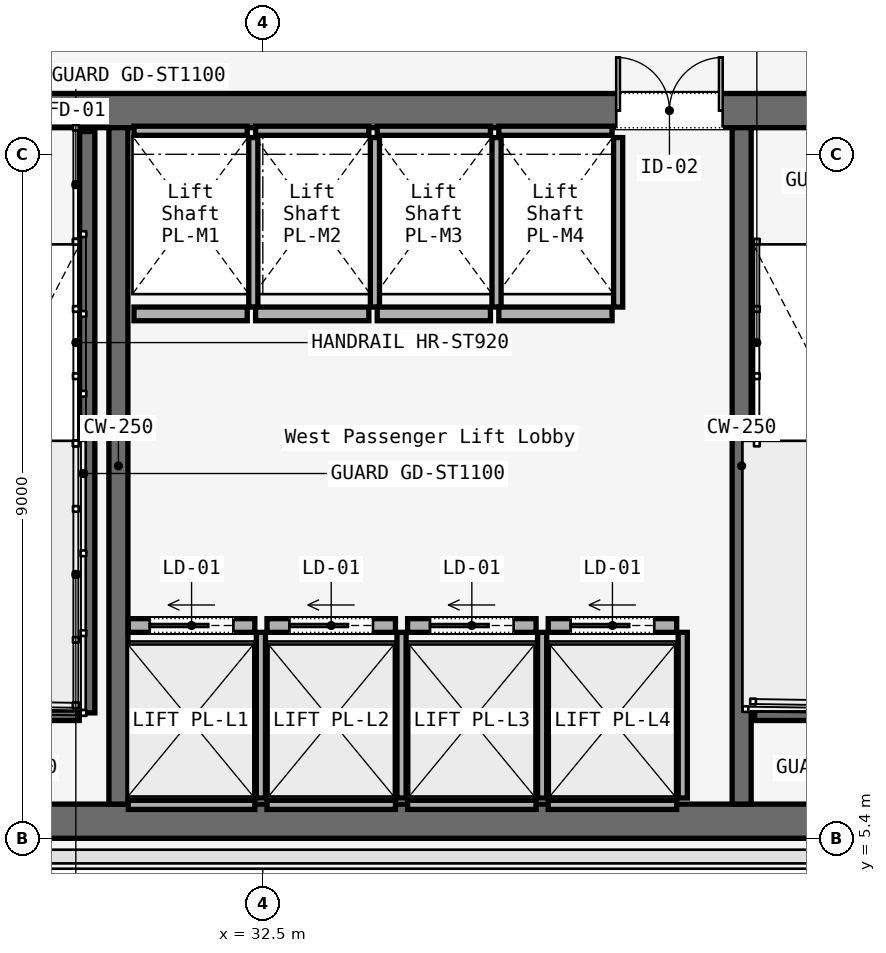
"""IFC4 building model, lengths in metres.
Left out: names, types, materials, properties, quantities, classifications, styles, units other than length and angle.
Written with IfcOpenShell. Run it as: python <this file> out.ifc"""

import sys

from ifc_helpers import new_model, si_unit, direction, frame, frame_2d, origin, place, context, subcontext, project, spatial, rectangle, extrude, element, fill, save


model = new_model("IFC4")
c1 = context("Model", 3, precision=1e-05, world=origin(), true_north=direction((0.0, 1.0)))
c2 = subcontext(c1, "Body", "Model", "MODEL_VIEW")
j1 = project(units=[si_unit("LENGTHUNIT", "METRE"), si_unit("PLANEANGLEUNIT", "RADIAN")], contexts=[c1])
p1 = place(None, origin())
s1 = spatial("IfcSite", under=j1, at=p1, CompositionType="ELEMENT")
p2 = place(p1, origin())
s2 = spatial("IfcBuilding", under=s1, at=p2, CompositionType="ELEMENT")
p3 = place(p2, frame((0.0, 0.0, 89.2)))
s3 = spatial("IfcBuildingStorey", under=s2, at=p3, CompositionType="ELEMENT", Elevation=89.2)
p4 = place(p3, frame((26.45, 14.975, 0.0), z_axis=(0.0, 0.0, 1.0), x_axis=(1.0, 0.0, 0.0)))
e1 = element("IfcWall", 1, at=p4, inside=s3, PredefinedType="SOLIDWALL", context=c2, shape_type="SweptSolid", body=[
    extrude(rectangle(XDim=31.1, YDim=0.45, at=frame_2d((15.55, 0.0))), origin(), (0.0, 0.0, 1.0), 3.58),
])
p5 = place(p4, frame((1.65, 0.0, 0.0)))
e2 = element("IfcOpeningElement", 2, at=p5, cuts=e1, PredefinedType="OPENING", context=c2, shape_type="SweptSolid", body=[
    extrude(rectangle(XDim=1.1, YDim=2.2, at=frame_2d((0.55, 1.1))), frame((0.0, 0.225, 0.0), z_axis=(0.0, -1.0, 0.0), x_axis=(1.0, 0.0, 0.0)), (0.0, 0.0, 1.0), 0.45),
])
p6 = place(p4, frame((13.65, 0.0, 0.0)))
e3 = element("IfcOpeningElement", 3, at=p6, cuts=e1, PredefinedType="OPENING", context=c2, shape_type="SweptSolid", body=[
    extrude(rectangle(XDim=1.1, YDim=2.2, at=frame_2d((0.55, 1.1))), frame((0.0, 0.225, 0.0), z_axis=(0.0, -1.0, 0.0), x_axis=(1.0, 0.0, 0.0)), (0.0, 0.0, 1.0), 0.45),
])
p7 = place(p4, frame((25.55, 0.0, 0.0)))
e4 = element("IfcOpeningElement", 4, at=p7, cuts=e1, PredefinedType="OPENING", context=c2, shape_type="SweptSolid", body=[
    extrude(rectangle(XDim=1.1, YDim=2.2, at=frame_2d((0.55, 1.1))), frame((0.0, 0.225, 0.0), z_axis=(0.0, -1.0, 0.0), x_axis=(1.0, 0.0, 0.0)), (0.0, 0.0, 1.0), 0.45),
])
p8 = place(p4, frame((10.7, 0.0, 0.0)))
e5 = element("IfcOpeningElement", 5, at=p8, cuts=e1, PredefinedType="OPENING", context=c2, shape_type="SweptSolid", body=[
    extrude(rectangle(XDim=1.4, YDim=2.2, at=frame_2d((0.7, 1.1))), frame((0.0, 0.225, 0.0), z_axis=(0.0, -1.0, 0.0), x_axis=(1.0, 0.0, 0.0)), (0.0, 0.0, 1.0), 0.45),
])
p9 = place(p4, frame((19.35, 0.0, 0.0)))
e6 = element("IfcOpeningElement", 6, at=p9, cuts=e1, PredefinedType="OPENING", context=c2, shape_type="SweptSolid", body=[
    extrude(rectangle(XDim=1.1, YDim=2.2, at=frame_2d((0.55, 1.1))), frame((0.0, 0.225, 0.0), z_axis=(0.0, -1.0, 0.0), x_axis=(1.0, 0.0, 0.0)), (0.0, 0.0, 1.0), 0.45),
])
p10 = place(p4, frame((21.4, 0.0, 0.0)))
e7 = element("IfcOpeningElement", 7, at=p10, cuts=e1, PredefinedType="OPENING", context=c2, shape_type="SweptSolid", body=[
    extrude(rectangle(XDim=0.9, YDim=2.1, at=frame_2d((0.45, 1.05))), frame((0.0, 0.225, 0.0), z_axis=(0.0, -1.0, 0.0), x_axis=(1.0, 0.0, 0.0)), (0.0, 0.0, 1.0), 0.45),
])
p11 = place(p4, frame((23.35, 0.0, 0.0)))
e8 = element("IfcOpeningElement", 8, at=p11, cuts=e1, PredefinedType="OPENING", context=c2, shape_type="SweptSolid", body=[
    extrude(rectangle(XDim=1.3, YDim=2.3, at=frame_2d((0.65, 1.15))), frame((0.0, 0.225, 0.0), z_axis=(0.0, -1.0, 0.0), x_axis=(1.0, 0.0, 0.0)), (0.0, 0.0, 1.0), 0.45),
])
p12 = place(p3, frame((26.45, 5.625, 0.0), z_axis=(0.0, 0.0, 1.0), x_axis=(1.0, 0.0, 0.0)))
e9 = element("IfcWall", 9, at=p12, inside=s3, PredefinedType="SOLIDWALL", context=c2, shape_type="SweptSolid", body=[
    extrude(rectangle(XDim=31.1, YDim=0.45, at=frame_2d((15.55, 0.0))), origin(), (0.0, 0.0, 1.0), 3.58),
])
for number, where, z_axis, x_axis in (
    (10, (30.6, 5.85, 0.0), (0.0, 0.0, 1.0), (0.0, 1.0, 0.0)),
    (11, (38.8, 5.85, 0.0), (0.0, 0.0, 1.0), (0.0, 1.0, 0.0)),
):
    element("IfcWall", number, at=place(p3, frame(where, z_axis=z_axis, x_axis=x_axis)), inside=s3, PredefinedType="SOLIDWALL", context=c2, shape_type="SweptSolid", body=[
        extrude(rectangle(XDim=8.9, YDim=0.25, at=frame_2d((4.45, 0.0))), origin(), (0.0, 0.0, 1.0), 3.58),
    ])
p13 = place(p3, frame((30.19, 14.7, 0.0), z_axis=(0.0, 0.0, 1.0), x_axis=(0.0, -1.0, 0.0)))
e12 = element("IfcWall", 12, at=p13, inside=s3, PredefinedType="SOLIDWALL", context=c2, shape_type="SweptSolid", body=[
    extrude(rectangle(XDim=7.65, YDim=0.2, at=frame_2d((3.825, 0.0))), origin(), (0.0, 0.0, 1.0), 3.8),
])
for number, where, z_axis, x_axis in (
    (13, (26.97, 7.05, 0.0), (0.0, 0.0, 1.0), (1.0, 0.0, 0.0)),
    (14, (38.97, 7.05, 0.0), (0.0, 0.0, 1.0), (1.0, 0.0, 0.0)),
):
    element("IfcWall", number, at=place(p3, frame(where, z_axis=z_axis, x_axis=x_axis)), inside=s3, PredefinedType="SOLIDWALL", context=c2, shape_type="SweptSolid", body=[
        extrude(rectangle(XDim=3.115, YDim=0.2, at=frame_2d((1.558, 0.0))), origin(), (0.0, 0.0, 1.0), 3.8),
    ])
p14 = place(p3, frame((30.73, 8.2, 0.0), z_axis=(0.0, 0.0, 1.0), x_axis=(1.0, 0.0, 0.0)))
e15 = element("IfcWall", 15, at=p14, inside=s3, PredefinedType="SOLIDWALL", context=c2, shape_type="SweptSolid", body=[
    extrude(rectangle(XDim=1.665, YDim=0.18, at=frame_2d((0.833, 0.0))), origin(), (0.0, 0.0, 1.0), 2.95),
])
p15 = place(p14, frame((0.282, 0.0, 0.0)))
e16 = element("IfcOpeningElement", 16, at=p15, cuts=e15, PredefinedType="OPENING", context=c2, shape_type="SweptSolid", body=[
    extrude(rectangle(XDim=1.1, YDim=2.2, at=frame_2d((0.55, 1.1))), frame((0.0, 0.09, 0.0), z_axis=(0.0, -1.0, 0.0), x_axis=(1.0, 0.0, 0.0)), (0.0, 0.0, 1.0), 0.18),
])
p16 = place(p3, frame((30.73, 5.84, 0.0), z_axis=(0.0, 0.0, 1.0), x_axis=(1.0, 0.0, 0.0)))
e17 = element("IfcWall", 17, at=p16, inside=s3, PredefinedType="SOLIDWALL", context=c2, shape_type="SweptSolid", body=[
    extrude(rectangle(XDim=1.665, YDim=0.12, at=frame_2d((0.833, 0.0))), origin(), (0.0, 0.0, 1.0), 2.95),
])
p17 = place(p3, frame((32.475, 5.93, 0.0), z_axis=(0.0, 0.0, 1.0), x_axis=(0.0, 1.0, 0.0)))
e18 = element("IfcWall", 18, at=p17, inside=s3, PredefinedType="SOLIDWALL", context=c2, shape_type="SweptSolid", body=[
    extrude(rectangle(XDim=2.18, YDim=0.12, at=frame_2d((1.09, 0.0))), origin(), (0.0, 0.0, 1.0), 2.95),
])
p18 = place(p3, frame((32.555, 8.2, 0.0), z_axis=(0.0, 0.0, 1.0), x_axis=(1.0, 0.0, 0.0)))
e19 = element("IfcWall", 19, at=p18, inside=s3, PredefinedType="SOLIDWALL", context=c2, shape_type="SweptSolid", body=[
    extrude(rectangle(XDim=1.69, YDim=0.18, at=frame_2d((0.845, 0.0))), origin(), (0.0, 0.0, 1.0), 2.95),
])
p19 = place(p18, frame((0.295, 0.0, 0.0)))
e20 = element("IfcOpeningElement", 20, at=p19, cuts=e19, PredefinedType="OPENING", context=c2, shape_type="SweptSolid", body=[
    extrude(rectangle(XDim=1.1, YDim=2.2, at=frame_2d((0.55, 1.1))), frame((0.0, 0.09, 0.0), z_axis=(0.0, -1.0, 0.0), x_axis=(1.0, 0.0, 0.0)), (0.0, 0.0, 1.0), 0.18),
])
p20 = place(p3, frame((32.555, 5.84, 0.0), z_axis=(0.0, 0.0, 1.0), x_axis=(1.0, 0.0, 0.0)))
e21 = element("IfcWall", 21, at=p20, inside=s3, PredefinedType="SOLIDWALL", context=c2, shape_type="SweptSolid", body=[
    extrude(rectangle(XDim=1.69, YDim=0.12, at=frame_2d((0.845, 0.0))), origin(), (0.0, 0.0, 1.0), 2.95),
])
p21 = place(p3, frame((34.325, 5.93, 0.0), z_axis=(0.0, 0.0, 1.0), x_axis=(0.0, 1.0, 0.0)))
e22 = element("IfcWall", 22, at=p21, inside=s3, PredefinedType="SOLIDWALL", context=c2, shape_type="SweptSolid", body=[
    extrude(rectangle(XDim=2.18, YDim=0.12, at=frame_2d((1.09, 0.0))), origin(), (0.0, 0.0, 1.0), 2.95),
])
p22 = place(p3, frame((34.405, 8.2, 0.0), z_axis=(0.0, 0.0, 1.0), x_axis=(1.0, 0.0, 0.0)))
e23 = element("IfcWall", 23, at=p22, inside=s3, PredefinedType="SOLIDWALL", context=c2, shape_type="SweptSolid", body=[
    extrude(rectangle(XDim=1.69, YDim=0.18, at=frame_2d((0.845, 0.0))), origin(), (0.0, 0.0, 1.0), 2.95),
])
p23 = place(p22, frame((0.295, 0.0, 0.0)))
e24 = element("IfcOpeningElement", 24, at=p23, cuts=e23, PredefinedType="OPENING", context=c2, shape_type="SweptSolid", body=[
    extrude(rectangle(XDim=1.1, YDim=2.2, at=frame_2d((0.55, 1.1))), frame((0.0, 0.09, 0.0), z_axis=(0.0, -1.0, 0.0), x_axis=(1.0, 0.0, 0.0)), (0.0, 0.0, 1.0), 0.18),
])
p24 = place(p3, frame((34.405, 5.84, 0.0), z_axis=(0.0, 0.0, 1.0), x_axis=(1.0, 0.0, 0.0)))
e25 = element("IfcWall", 25, at=p24, inside=s3, PredefinedType="SOLIDWALL", context=c2, shape_type="SweptSolid", body=[
    extrude(rectangle(XDim=1.69, YDim=0.12, at=frame_2d((0.845, 0.0))), origin(), (0.0, 0.0, 1.0), 2.95),
])
p25 = place(p3, frame((36.175, 5.93, 0.0), z_axis=(0.0, 0.0, 1.0), x_axis=(0.0, 1.0, 0.0)))
e26 = element("IfcWall", 26, at=p25, inside=s3, PredefinedType="SOLIDWALL", context=c2, shape_type="SweptSolid", body=[
    extrude(rectangle(XDim=2.18, YDim=0.12, at=frame_2d((1.09, 0.0))), origin(), (0.0, 0.0, 1.0), 2.95),
])
p26 = place(p3, frame((36.255, 8.2, 0.0), z_axis=(0.0, 0.0, 1.0), x_axis=(1.0, 0.0, 0.0)))
e27 = element("IfcWall", 27, at=p26, inside=s3, PredefinedType="SOLIDWALL", context=c2, shape_type="SweptSolid", body=[
    extrude(rectangle(XDim=1.69, YDim=0.18, at=frame_2d((0.845, 0.0))), origin(), (0.0, 0.0, 1.0), 2.95),
])
p27 = place(p26, frame((0.295, 0.0, 0.0)))
e28 = element("IfcOpeningElement", 28, at=p27, cuts=e27, PredefinedType="OPENING", context=c2, shape_type="SweptSolid", body=[
    extrude(rectangle(XDim=1.1, YDim=2.2, at=frame_2d((0.55, 1.1))), frame((0.0, 0.09, 0.0), z_axis=(0.0, -1.0, 0.0), x_axis=(1.0, 0.0, 0.0)), (0.0, 0.0, 1.0), 0.18),
])
p28 = place(p3, frame((36.255, 5.84, 0.0), z_axis=(0.0, 0.0, 1.0), x_axis=(1.0, 0.0, 0.0)))
e29 = element("IfcWall", 29, at=p28, inside=s3, PredefinedType="SOLIDWALL", context=c2, shape_type="SweptSolid", body=[
    extrude(rectangle(XDim=1.69, YDim=0.12, at=frame_2d((0.845, 0.0))), origin(), (0.0, 0.0, 1.0), 2.95),
])
p29 = place(p3, frame((38.025, 5.93, 0.0), z_axis=(0.0, 0.0, 1.0), x_axis=(0.0, 1.0, 0.0)))
e30 = element("IfcWall", 30, at=p29, inside=s3, PredefinedType="SOLIDWALL", context=c2, shape_type="SweptSolid", body=[
    extrude(rectangle(XDim=2.18, YDim=0.12, at=frame_2d((1.09, 0.0))), origin(), (0.0, 0.0, 1.0), 2.95),
])
p30 = place(p3, frame((30.805, 12.3, 0.0), z_axis=(0.0, 0.0, 1.0), x_axis=(1.0, 0.0, 0.0)))
e31 = element("IfcWall", 31, at=p30, inside=s3, PredefinedType="SOLIDWALL", context=c2, shape_type="SweptSolid", body=[
    extrude(rectangle(XDim=1.49, YDim=0.18, at=frame_2d((0.745, 0.0))), origin(), (0.0, 0.0, 1.0), 2.95),
])
p31 = place(p3, frame((30.805, 14.71, 0.0), z_axis=(0.0, 0.0, 1.0), x_axis=(1.0, 0.0, 0.0)))
e32 = element("IfcWall", 32, at=p31, inside=s3, PredefinedType="SOLIDWALL", context=c2, shape_type="SweptSolid", body=[
    extrude(rectangle(XDim=1.49, YDim=0.12, at=frame_2d((0.745, 0.0))), origin(), (0.0, 0.0, 1.0), 2.95),
])
p32 = place(p3, frame((32.375, 12.39, 0.0), z_axis=(0.0, 0.0, 1.0), x_axis=(0.0, 1.0, 0.0)))
e33 = element("IfcWall", 33, at=p32, inside=s3, PredefinedType="SOLIDWALL", context=c2, shape_type="SweptSolid", body=[
    extrude(rectangle(XDim=2.23, YDim=0.12, at=frame_2d((1.115, 0.0))), origin(), (0.0, 0.0, 1.0), 2.95),
])
p33 = place(p3, frame((32.405, 12.3, 0.0), z_axis=(0.0, 0.0, 1.0), x_axis=(1.0, 0.0, 0.0)))
e34 = element("IfcWall", 34, at=p33, inside=s3, PredefinedType="SOLIDWALL", context=c2, shape_type="SweptSolid", body=[
    extrude(rectangle(XDim=1.49, YDim=0.18, at=frame_2d((0.745, 0.0))), origin(), (0.0, 0.0, 1.0), 2.95),
])
p34 = place(p3, frame((32.405, 14.71, 0.0), z_axis=(0.0, 0.0, 1.0), x_axis=(1.0, 0.0, 0.0)))
e35 = element("IfcWall", 35, at=p34, inside=s3, PredefinedType="SOLIDWALL", context=c2, shape_type="SweptSolid", body=[
    extrude(rectangle(XDim=1.49, YDim=0.12, at=frame_2d((0.745, 0.0))), origin(), (0.0, 0.0, 1.0), 2.95),
])
p35 = place(p3, frame((33.975, 12.39, 0.0), z_axis=(0.0, 0.0, 1.0), x_axis=(0.0, 1.0, 0.0)))
e36 = element("IfcWall", 36, at=p35, inside=s3, PredefinedType="SOLIDWALL", context=c2, shape_type="SweptSolid", body=[
    extrude(rectangle(XDim=2.23, YDim=0.12, at=frame_2d((1.115, 0.0))), origin(), (0.0, 0.0, 1.0), 2.95),
])
p36 = place(p3, frame((34.005, 12.3, 0.0), z_axis=(0.0, 0.0, 1.0), x_axis=(1.0, 0.0, 0.0)))
e37 = element("IfcWall", 37, at=p36, inside=s3, PredefinedType="SOLIDWALL", context=c2, shape_type="SweptSolid", body=[
    extrude(rectangle(XDim=1.49, YDim=0.18, at=frame_2d((0.745, 0.0))), origin(), (0.0, 0.0, 1.0), 2.95),
])
p37 = place(p3, frame((34.005, 14.71, 0.0), z_axis=(0.0, 0.0, 1.0), x_axis=(1.0, 0.0, 0.0)))
e38 = element("IfcWall", 38, at=p37, inside=s3, PredefinedType="SOLIDWALL", context=c2, shape_type="SweptSolid", body=[
    extrude(rectangle(XDim=1.49, YDim=0.12, at=frame_2d((0.745, 0.0))), origin(), (0.0, 0.0, 1.0), 2.95),
])
p38 = place(p3, frame((35.575, 12.39, 0.0), z_axis=(0.0, 0.0, 1.0), x_axis=(0.0, 1.0, 0.0)))
e39 = element("IfcWall", 39, at=p38, inside=s3, PredefinedType="SOLIDWALL", context=c2, shape_type="SweptSolid", body=[
    extrude(rectangle(XDim=2.23, YDim=0.12, at=frame_2d((1.115, 0.0))), origin(), (0.0, 0.0, 1.0), 2.95),
])
p39 = place(p3, frame((35.605, 12.3, 0.0), z_axis=(0.0, 0.0, 1.0), x_axis=(1.0, 0.0, 0.0)))
e40 = element("IfcWall", 40, at=p39, inside=s3, PredefinedType="SOLIDWALL", context=c2, shape_type="SweptSolid", body=[
    extrude(rectangle(XDim=1.49, YDim=0.18, at=frame_2d((0.745, 0.0))), origin(), (0.0, 0.0, 1.0), 2.95),
])
p40 = place(p3, frame((35.605, 14.71, 0.0), z_axis=(0.0, 0.0, 1.0), x_axis=(1.0, 0.0, 0.0)))
e41 = element("IfcWall", 41, at=p40, inside=s3, PredefinedType="SOLIDWALL", context=c2, shape_type="SweptSolid", body=[
    extrude(rectangle(XDim=1.49, YDim=0.12, at=frame_2d((0.745, 0.0))), origin(), (0.0, 0.0, 1.0), 2.95),
])
p41 = place(p3, frame((37.175, 12.39, 0.0), z_axis=(0.0, 0.0, 1.0), x_axis=(0.0, 1.0, 0.0)))
e42 = element("IfcWall", 42, at=p41, inside=s3, PredefinedType="SOLIDWALL", context=c2, shape_type="SweptSolid", body=[
    extrude(rectangle(XDim=2.23, YDim=0.12, at=frame_2d((1.115, 0.0))), origin(), (0.0, 0.0, 1.0), 2.95),
])
p42 = place(p8, origin())
e43 = element("IfcDoor", 43, at=p42, inside=s3, OperationType="DOUBLE_DOOR_SINGLE_SWING", PredefinedType="DOOR", context=c2, shape_type="SweptSolid", body=[
    extrude(rectangle(XDim=1.4, YDim=2.2, at=frame_2d((0.7, 1.1))), frame((0.0, 0.025, 0.0), z_axis=(0.0, -1.0, 0.0), x_axis=(1.0, 0.0, 0.0)), (0.0, 0.0, 1.0), 0.05),
])
fill(e5, e43)
p43 = place(p15, origin())
e44 = element("IfcDoor", 44, at=p43, inside=s3, OperationType="SLIDING_TO_LEFT", PredefinedType="DOOR", context=c2, shape_type="SweptSolid", body=[
    extrude(rectangle(XDim=1.1, YDim=2.2, at=frame_2d((0.55, 1.1))), frame((0.0, 0.025, 0.0), z_axis=(0.0, -1.0, 0.0), x_axis=(1.0, 0.0, 0.0)), (0.0, 0.0, 1.0), 0.05),
])
fill(e16, e44)
p44 = place(p19, origin())
e45 = element("IfcDoor", 45, at=p44, inside=s3, OperationType="SLIDING_TO_LEFT", PredefinedType="DOOR", context=c2, shape_type="SweptSolid", body=[
    extrude(rectangle(XDim=1.1, YDim=2.2, at=frame_2d((0.55, 1.1))), frame((0.0, 0.025, 0.0), z_axis=(0.0, -1.0, 0.0), x_axis=(1.0, 0.0, 0.0)), (0.0, 0.0, 1.0), 0.05),
])
fill(e20, e45)
p45 = place(p23, origin())
e46 = element("IfcDoor", 46, at=p45, inside=s3, OperationType="SLIDING_TO_LEFT", PredefinedType="DOOR", context=c2, shape_type="SweptSolid", body=[
    extrude(rectangle(XDim=1.1, YDim=2.2, at=frame_2d((0.55, 1.1))), frame((0.0, 0.025, 0.0), z_axis=(0.0, -1.0, 0.0), x_axis=(1.0, 0.0, 0.0)), (0.0, 0.0, 1.0), 0.05),
])
fill(e24, e46)
p46 = place(p27, origin())
e47 = element("IfcDoor", 47, at=p46, inside=s3, OperationType="SLIDING_TO_LEFT", PredefinedType="DOOR", context=c2, shape_type="SweptSolid", body=[
    extrude(rectangle(XDim=1.1, YDim=2.2, at=frame_2d((0.55, 1.1))), frame((0.0, 0.025, 0.0), z_axis=(0.0, -1.0, 0.0), x_axis=(1.0, 0.0, 0.0)), (0.0, 0.0, 1.0), 0.05),
])
fill(e28, e47)
save(model, sys.argv[1])
